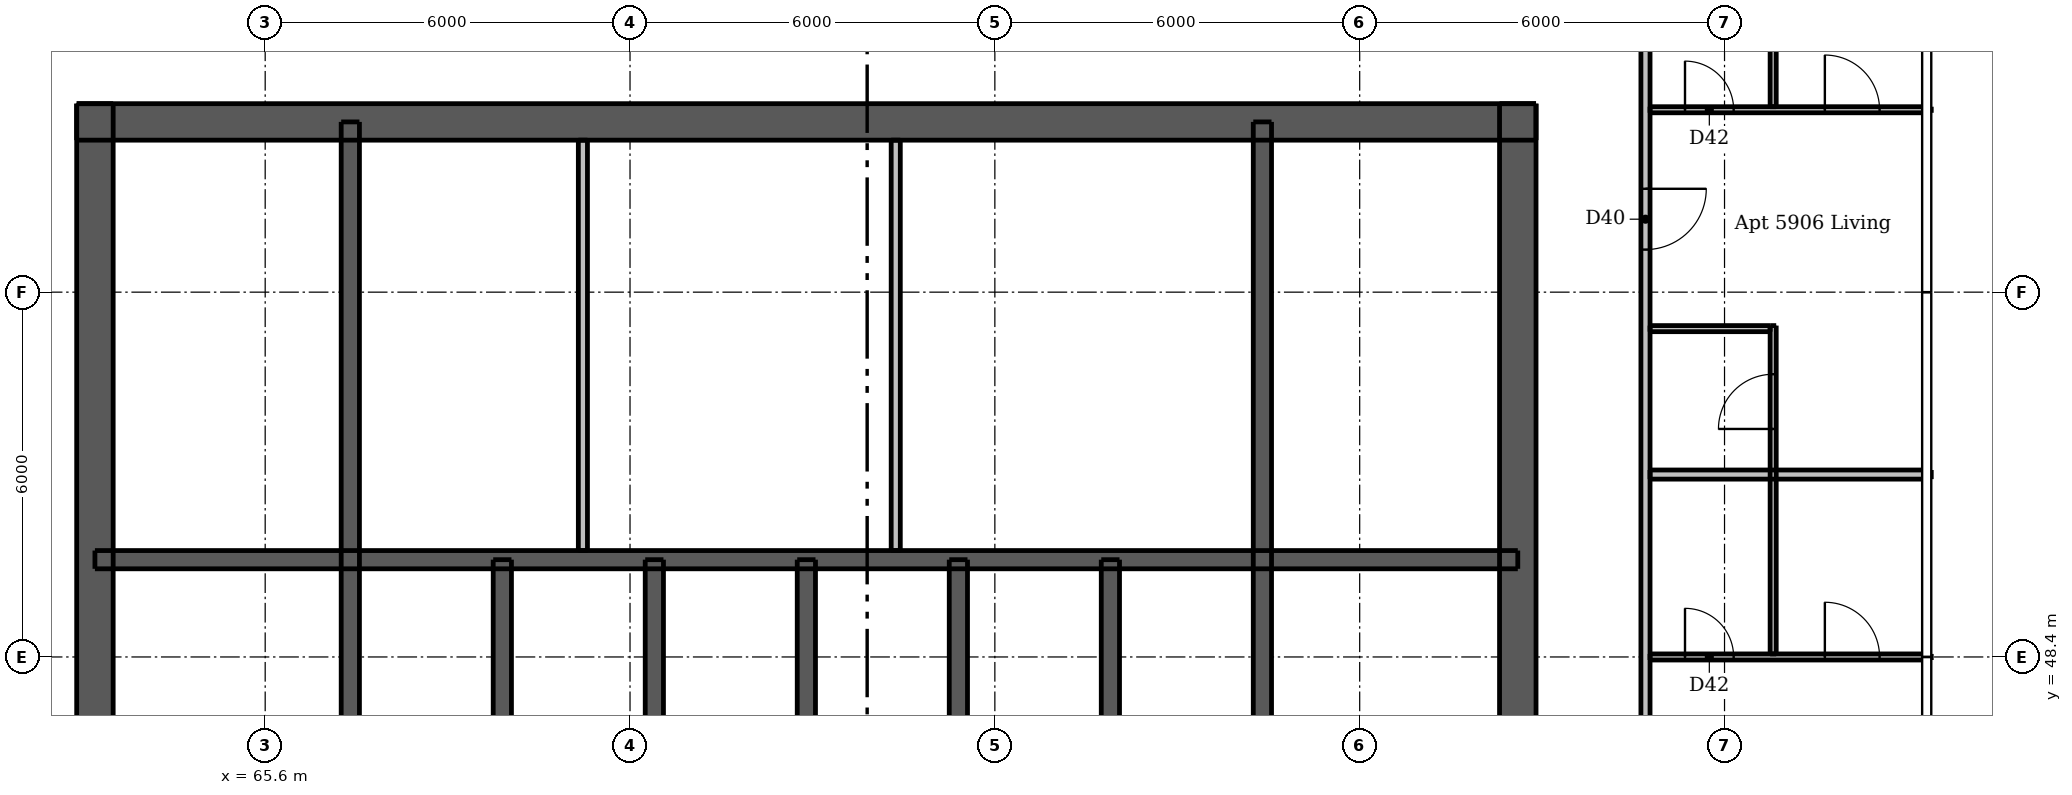
"""IFC4 building model, lengths in metres.
Left out: names, types, materials, properties, quantities, classifications, styles, units other than length and angle.
Written with IfcOpenShell. Run it as: python <this file> out.ifc"""

import sys

from ifc_helpers import new_model, si_unit, direction, frame, frame_2d, origin, place, context, subcontext, project, spatial, rectangle, extrude, element, fill, save


model = new_model("IFC4")
c1 = context("Model", 3, precision=1e-05, world=origin(), true_north=direction((0.0, 1.0)))
c2 = subcontext(c1, "Body", "Model", "MODEL_VIEW")
j1 = project(units=[si_unit("LENGTHUNIT", "METRE"), si_unit("PLANEANGLEUNIT", "RADIAN")], contexts=[c1])
p1 = place(None, origin())
s1 = spatial("IfcSite", under=j1, at=p1, CompositionType="ELEMENT")
p2 = place(p1, origin())
s2 = spatial("IfcBuilding", under=s1, at=p2, CompositionType="ELEMENT")
p3 = place(p2, frame((0.0, 0.0, 220.0)))
s3 = spatial("IfcBuildingStorey", under=s2, at=p3, CompositionType="ELEMENT", Elevation=220.0)
p4 = place(p3, frame((62.5, 57.2, 0.0), z_axis=(0.0, 0.0, 1.0), x_axis=(1.0, 0.0, 0.0)))
e1 = element("IfcWall", 1, at=p4, inside=s3, PredefinedType="SHEAR", context=c2, shape_type="SweptSolid", body=[
    extrude(rectangle(XDim=24.0, YDim=0.6, at=frame_2d((12.0, 0.0))), origin(), (0.0, 0.0, 1.0), 3.05),
])
p5 = place(p4, frame((20.975, 0.0, 0.0)))
e2 = element("IfcOpeningElement", 2, at=p5, cuts=e1, PredefinedType="OPENING", context=c2, shape_type="SweptSolid", body=[
    extrude(rectangle(XDim=1.1, YDim=2.1, at=frame_2d((0.55, 1.05))), frame((0.0, 0.31, 0.0), z_axis=(0.0, -1.0, 0.0), x_axis=(1.0, 0.0, 0.0)), (0.0, 0.0, 1.0), 0.62),
])
p6 = place(p4, frame((1.925, 0.0, 0.0)))
e3 = element("IfcOpeningElement", 3, at=p6, cuts=e1, PredefinedType="OPENING", context=c2, shape_type="SweptSolid", body=[
    extrude(rectangle(XDim=1.1, YDim=2.1, at=frame_2d((0.55, 1.05))), frame((0.0, 0.31, 0.0), z_axis=(0.0, -1.0, 0.0), x_axis=(1.0, 0.0, 0.0)), (0.0, 0.0, 1.0), 0.62),
])
p7 = place(p4, frame((6.038, 0.0, 0.0)))
e4 = element("IfcOpeningElement", 4, at=p7, cuts=e1, PredefinedType="OPENING", context=c2, shape_type="SweptSolid", body=[
    extrude(rectangle(XDim=0.9, YDim=2.1, at=frame_2d((0.45, 1.05))), frame((0.0, 0.31, 0.0), z_axis=(0.0, -1.0, 0.0), x_axis=(1.0, 0.0, 0.0)), (0.0, 0.0, 1.0), 0.62),
])
p8 = place(p4, frame((10.448, 0.0, 0.0)))
e5 = element("IfcOpeningElement", 5, at=p8, cuts=e1, PredefinedType="OPENING", context=c2, shape_type="SweptSolid", body=[
    extrude(rectangle(XDim=0.9, YDim=2.1, at=frame_2d((0.45, 1.05))), frame((0.0, 0.31, 0.0), z_axis=(0.0, -1.0, 0.0), x_axis=(1.0, 0.0, 0.0)), (0.0, 0.0, 1.0), 0.62),
])
p9 = place(p4, frame((15.96, 0.0, 0.0)))
e6 = element("IfcOpeningElement", 6, at=p9, cuts=e1, PredefinedType="OPENING", context=c2, shape_type="SweptSolid", body=[
    extrude(rectangle(XDim=0.9, YDim=2.1, at=frame_2d((0.45, 1.05))), frame((0.0, 0.31, 0.0), z_axis=(0.0, -1.0, 0.0), x_axis=(1.0, 0.0, 0.0)), (0.0, 0.0, 1.0), 0.62),
])
p10 = place(p3, frame((62.8, 33.5, 0.0), z_axis=(0.0, 0.0, 1.0), x_axis=(0.0, 1.0, 0.0)))
e7 = element("IfcWall", 7, at=p10, inside=s3, PredefinedType="SHEAR", context=c2, shape_type="SweptSolid", body=[
    extrude(rectangle(XDim=24.0, YDim=0.6, at=frame_2d((12.0, 0.0))), origin(), (0.0, 0.0, 1.0), 3.05),
])
p11 = place(p10, frame((11.2, 0.0, 0.0)))
e8 = element("IfcOpeningElement", 8, at=p11, cuts=e7, PredefinedType="OPENING", context=c2, shape_type="SweptSolid", body=[
    extrude(rectangle(XDim=1.6, YDim=2.1, at=frame_2d((0.8, 1.05))), frame((0.0, 0.31, 0.0), z_axis=(0.0, -1.0, 0.0), x_axis=(1.0, 0.0, 0.0)), (0.0, 0.0, 1.0), 0.62),
])
p12 = place(p3, frame((86.2, 33.5, 0.0), z_axis=(0.0, 0.0, 1.0), x_axis=(0.0, 1.0, 0.0)))
e9 = element("IfcWall", 9, at=p12, inside=s3, PredefinedType="SHEAR", context=c2, shape_type="SweptSolid", body=[
    extrude(rectangle(XDim=24.0, YDim=0.6, at=frame_2d((12.0, 0.0))), origin(), (0.0, 0.0, 1.0), 3.05),
])
p13 = place(p12, frame((11.2, 0.0, 0.0)))
e10 = element("IfcOpeningElement", 10, at=p13, cuts=e9, PredefinedType="OPENING", context=c2, shape_type="SweptSolid", body=[
    extrude(rectangle(XDim=1.6, YDim=2.1, at=frame_2d((0.8, 1.05))), frame((0.0, 0.31, 0.0), z_axis=(0.0, -1.0, 0.0), x_axis=(1.0, 0.0, 0.0)), (0.0, 0.0, 1.0), 0.62),
])
p14 = place(p3, frame((62.8, 50.0, 0.0), z_axis=(0.0, 0.0, 1.0), x_axis=(1.0, 0.0, 0.0)))
e11 = element("IfcWall", 11, at=p14, inside=s3, PredefinedType="SHEAR", context=c2, shape_type="SweptSolid", body=[
    extrude(rectangle(XDim=23.4, YDim=0.3, at=frame_2d((11.7, 0.0))), origin(), (0.0, 0.0, 1.0), 3.05),
])
for number, where, z_axis, x_axis in (
    (12, (67.0, 47.1, 0.0), (0.0, 0.0, 1.0), (0.0, 1.0, 0.0)),
    (13, (82.0, 47.1, 0.0), (0.0, 0.0, 1.0), (0.0, 1.0, 0.0)),
):
    element("IfcWall", number, at=place(p3, frame(where, z_axis=z_axis, x_axis=x_axis)), inside=s3, PredefinedType="SHEAR", context=c2, shape_type="SweptSolid", body=[
        extrude(rectangle(XDim=10.1, YDim=0.3, at=frame_2d((5.05, 0.0))), origin(), (0.0, 0.0, 1.0), 3.05),
    ])
for number, where, z_axis, x_axis in (
    (14, (69.5, 47.1, 0.0), (0.0, 0.0, 1.0), (0.0, 1.0, 0.0)),
    (15, (72.0, 47.1, 0.0), (0.0, 0.0, 1.0), (0.0, 1.0, 0.0)),
    (16, (74.5, 47.1, 0.0), (0.0, 0.0, 1.0), (0.0, 1.0, 0.0)),
    (17, (77.0, 47.1, 0.0), (0.0, 0.0, 1.0), (0.0, 1.0, 0.0)),
    (18, (79.5, 47.1, 0.0), (0.0, 0.0, 1.0), (0.0, 1.0, 0.0)),
):
    element("IfcWall", number, at=place(p3, frame(where, z_axis=z_axis, x_axis=x_axis)), inside=s3, PredefinedType="SHEAR", context=c2, shape_type="SweptSolid", body=[
        extrude(rectangle(XDim=2.9, YDim=0.3, at=frame_2d((1.45, 0.0))), origin(), (0.0, 0.0, 1.0), 3.05),
    ])
for number, where, z_axis, x_axis in (
    (19, (70.825, 50.15, 0.0), (0.0, 0.0, 1.0), (0.0, 1.0, 0.0)),
    (20, (75.97, 50.15, 0.0), (0.0, 0.0, 1.0), (0.0, 1.0, 0.0)),
):
    element("IfcWall", number, at=place(p3, frame(where, z_axis=z_axis, x_axis=x_axis)), inside=s3, PredefinedType="PLUMBINGWALL", context=c2, shape_type="SweptSolid", body=[
        extrude(rectangle(XDim=6.75, YDim=0.15, at=frame_2d((3.375, 0.0))), origin(), (0.0, 0.0, 1.0), 3.05),
    ])
p15 = place(p3, frame((90.4, 48.45, 0.0), z_axis=(0.0, 0.0, 1.0), x_axis=(0.0, 1.0, 0.0)))
e21 = element("IfcWall", 21, at=p15, inside=s3, PredefinedType="PARTITIONING", context=c2, shape_type="SweptSolid", body=[
    extrude(rectangle(XDim=5.4, YDim=0.1, at=frame_2d((2.7, 0.0))), origin(), (0.0, 0.0, 1.0), 3.05),
])
p16 = place(p15, frame((3.7, 0.0, 0.0)))
e22 = element("IfcOpeningElement", 22, at=p16, cuts=e21, PredefinedType="OPENING", context=c2, shape_type="SweptSolid", body=[
    extrude(rectangle(XDim=0.9, YDim=2.1, at=frame_2d((0.45, 1.05))), frame((0.0, 0.06, 0.0), z_axis=(0.0, -1.0, 0.0), x_axis=(1.0, 0.0, 0.0)), (0.0, 0.0, 1.0), 0.12),
])
p17 = place(p3, frame((90.4, 57.45, 0.0), z_axis=(0.0, 0.0, 1.0), x_axis=(0.0, 1.0, 0.0)))
e23 = element("IfcWall", 23, at=p17, inside=s3, PredefinedType="PARTITIONING", context=c2, shape_type="SweptSolid", body=[
    extrude(rectangle(XDim=2.875, YDim=0.1, at=frame_2d((1.438, 0.0))), origin(), (0.0, 0.0, 1.0), 3.05),
])
p18 = place(p3, frame((88.375, 57.4, 0.0), z_axis=(0.0, 0.0, 1.0), x_axis=(1.0, 0.0, 0.0)))
e24 = element("IfcWall", 24, at=p18, inside=s3, PredefinedType="PARTITIONING", context=c2, shape_type="SweptSolid", body=[
    extrude(rectangle(XDim=4.625, YDim=0.1, at=frame_2d((2.312, 0.0))), origin(), (0.0, 0.0, 1.0), 3.05),
])
p19 = place(p18, frame((2.875, 0.0, 0.0)))
e25 = element("IfcOpeningElement", 25, at=p19, cuts=e24, PredefinedType="OPENING", context=c2, shape_type="SweptSolid", body=[
    extrude(rectangle(XDim=0.9, YDim=2.1, at=frame_2d((0.45, 1.05))), frame((0.0, 0.06, 0.0), z_axis=(0.0, -1.0, 0.0), x_axis=(1.0, 0.0, 0.0)), (0.0, 0.0, 1.0), 0.12),
])
p20 = place(p18, frame((0.575, 0.0, 0.0)))
e26 = element("IfcOpeningElement", 26, at=p20, cuts=e24, PredefinedType="OPENING", context=c2, shape_type="SweptSolid", body=[
    extrude(rectangle(XDim=0.8, YDim=2.1, at=frame_2d((0.4, 1.05))), frame((0.0, 0.06, 0.0), z_axis=(0.0, -1.0, 0.0), x_axis=(1.0, 0.0, 0.0)), (0.0, 0.0, 1.0), 0.12),
])
p21 = place(p3, frame((88.375, 53.8, 0.0), z_axis=(0.0, 0.0, 1.0), x_axis=(1.0, 0.0, 0.0)))
e27 = element("IfcWall", 27, at=p21, inside=s3, PredefinedType="PARTITIONING", context=c2, shape_type="SweptSolid", body=[
    extrude(rectangle(XDim=1.975, YDim=0.1, at=frame_2d((0.988, 0.0))), origin(), (0.0, 0.0, 1.0), 3.05),
])
p22 = place(p3, frame((88.375, 48.4, 0.0), z_axis=(0.0, 0.0, 1.0), x_axis=(1.0, 0.0, 0.0)))
e28 = element("IfcWall", 28, at=p22, inside=s3, PredefinedType="PARTITIONING", context=c2, shape_type="SweptSolid", body=[
    extrude(rectangle(XDim=4.625, YDim=0.1, at=frame_2d((2.312, 0.0))), origin(), (0.0, 0.0, 1.0), 2.516),
])
p23 = place(p22, frame((2.875, 0.0, 0.0)))
e29 = element("IfcOpeningElement", 29, at=p23, cuts=e28, PredefinedType="OPENING", context=c2, shape_type="SweptSolid", body=[
    extrude(rectangle(XDim=0.9, YDim=2.1, at=frame_2d((0.45, 1.05))), frame((0.0, 0.06, 0.0), z_axis=(0.0, -1.0, 0.0), x_axis=(1.0, 0.0, 0.0)), (0.0, 0.0, 1.0), 0.12),
])
p24 = place(p22, frame((0.575, 0.0, 0.0)))
e30 = element("IfcOpeningElement", 30, at=p24, cuts=e28, PredefinedType="OPENING", context=c2, shape_type="SweptSolid", body=[
    extrude(rectangle(XDim=0.8, YDim=2.1, at=frame_2d((0.4, 1.05))), frame((0.0, 0.06, 0.0), z_axis=(0.0, -1.0, 0.0), x_axis=(1.0, 0.0, 0.0)), (0.0, 0.0, 1.0), 0.12),
])
p25 = place(p3, frame((88.3, 61.175, 0.0), z_axis=(0.0, 0.0, 1.0), x_axis=(0.0, -1.0, 0.0)))
e31 = element("IfcWall", 31, at=p25, inside=s3, PredefinedType="PARTITIONING", context=c2, shape_type="SweptSolid", body=[
    extrude(rectangle(XDim=29.4, YDim=0.15, at=frame_2d((14.7, 0.0))), origin(), (0.0, 0.0, 1.0), 3.05),
])
p26 = place(p25, frame((28.125, 0.0, 0.0)))
e32 = element("IfcOpeningElement", 32, at=p26, cuts=e31, PredefinedType="OPENING", context=c2, shape_type="SweptSolid", body=[
    extrude(rectangle(XDim=1.0, YDim=2.1, at=frame_2d((0.5, 1.05))), frame((0.0, 0.085, 0.0), z_axis=(0.0, -1.0, 0.0), x_axis=(1.0, 0.0, 0.0)), (0.0, 0.0, 1.0), 0.17),
])
p27 = place(p25, frame((15.275, 0.0, 0.0)))
e33 = element("IfcOpeningElement", 33, at=p27, cuts=e31, PredefinedType="OPENING", context=c2, shape_type="SweptSolid", body=[
    extrude(rectangle(XDim=1.0, YDim=2.1, at=frame_2d((0.5, 1.05))), frame((0.0, 0.085, 0.0), z_axis=(0.0, -1.0, 0.0), x_axis=(1.0, 0.0, 0.0)), (0.0, 0.0, 1.0), 0.17),
])
p28 = place(p25, frame((5.075, 0.0, 0.0)))
e34 = element("IfcOpeningElement", 34, at=p28, cuts=e31, PredefinedType="OPENING", context=c2, shape_type="SweptSolid", body=[
    extrude(rectangle(XDim=1.0, YDim=2.1, at=frame_2d((0.5, 1.05))), frame((0.0, 0.085, 0.0), z_axis=(0.0, -1.0, 0.0), x_axis=(1.0, 0.0, 0.0)), (0.0, 0.0, 1.0), 0.17),
])
p29 = place(p3, frame((88.375, 51.4, 0.0), z_axis=(0.0, 0.0, 1.0), x_axis=(1.0, 0.0, 0.0)))
e35 = element("IfcWall", 35, at=p29, inside=s3, PredefinedType="PARTITIONING", context=c2, shape_type="SweptSolid", body=[
    extrude(rectangle(XDim=4.625, YDim=0.15, at=frame_2d((2.312, 0.0))), origin(), (0.0, 0.0, 1.0), 3.05),
])
p30 = place(p5, origin())
e36 = element("IfcDoor", 36, at=p30, inside=s3, OperationType="SINGLE_SWING_RIGHT", PredefinedType="DOOR", context=c2, shape_type="SweptSolid", body=[
    extrude(rectangle(XDim=1.1, YDim=2.1, at=frame_2d((0.55, 1.05))), frame((0.0, -0.237, 0.0), z_axis=(0.0, -1.0, 0.0), x_axis=(1.0, 0.0, 0.0)), (0.0, 0.0, 1.0), 0.05),
])
fill(e2, e36)
p31 = place(p6, origin())
e37 = element("IfcDoor", 37, at=p31, inside=s3, OperationType="SINGLE_SWING_LEFT", PredefinedType="DOOR", context=c2, shape_type="SweptSolid", body=[
    extrude(rectangle(XDim=1.1, YDim=2.1, at=frame_2d((0.55, 1.05))), frame((0.0, -0.237, 0.0), z_axis=(0.0, -1.0, 0.0), x_axis=(1.0, 0.0, 0.0)), (0.0, 0.0, 1.0), 0.05),
])
fill(e3, e37)
p32 = place(p7, origin())
e38 = element("IfcDoor", 38, at=p32, inside=s3, OperationType="SINGLE_SWING_RIGHT", PredefinedType="DOOR", context=c2, shape_type="SweptSolid", body=[
    extrude(rectangle(XDim=0.9, YDim=2.1, at=frame_2d((0.45, 1.05))), frame((0.0, -0.237, 0.0), z_axis=(0.0, -1.0, 0.0), x_axis=(1.0, 0.0, 0.0)), (0.0, 0.0, 1.0), 0.05),
])
fill(e4, e38)
p33 = place(p8, origin())
e39 = element("IfcDoor", 39, at=p33, inside=s3, OperationType="SINGLE_SWING_RIGHT", PredefinedType="DOOR", context=c2, shape_type="SweptSolid", body=[
    extrude(rectangle(XDim=0.9, YDim=2.1, at=frame_2d((0.45, 1.05))), frame((0.0, -0.237, 0.0), z_axis=(0.0, -1.0, 0.0), x_axis=(1.0, 0.0, 0.0)), (0.0, 0.0, 1.0), 0.05),
])
fill(e5, e39)
p34 = place(p9, origin())
e40 = element("IfcDoor", 40, at=p34, inside=s3, OperationType="SINGLE_SWING_RIGHT", PredefinedType="DOOR", context=c2, shape_type="SweptSolid", body=[
    extrude(rectangle(XDim=0.9, YDim=2.1, at=frame_2d((0.45, 1.05))), frame((0.0, -0.237, 0.0), z_axis=(0.0, -1.0, 0.0), x_axis=(1.0, 0.0, 0.0)), (0.0, 0.0, 1.0), 0.05),
])
fill(e6, e40)
p35 = place(p23, origin())
e41 = element("IfcDoor", 41, at=p35, inside=s3, OperationType="SINGLE_SWING_LEFT", PredefinedType="DOOR", context=c2, shape_type="SweptSolid", body=[
    extrude(rectangle(XDim=0.9, YDim=2.1, at=frame_2d((0.45, 1.05))), frame((0.0, 0.025, 0.0), z_axis=(0.0, -1.0, 0.0), x_axis=(1.0, 0.0, 0.0)), (0.0, 0.0, 1.0), 0.05),
])
fill(e29, e41)
p36 = place(p24, origin())
e42 = element("IfcDoor", 42, at=p36, inside=s3, OperationType="SINGLE_SWING_LEFT", PredefinedType="DOOR", context=c2, shape_type="SweptSolid", body=[
    extrude(rectangle(XDim=0.8, YDim=2.1, at=frame_2d((0.4, 1.05))), frame((0.0, 0.025, 0.0), z_axis=(0.0, -1.0, 0.0), x_axis=(1.0, 0.0, 0.0)), (0.0, 0.0, 1.0), 0.05),
])
fill(e30, e42)
p37 = place(p28, origin())
e43 = element("IfcDoor", 43, at=p37, inside=s3, OperationType="SINGLE_SWING_LEFT", PredefinedType="DOOR", context=c2, shape_type="SweptSolid", body=[
    extrude(rectangle(XDim=1.0, YDim=2.1, at=frame_2d((0.5, 1.05))), frame((0.0, 0.025, 0.0), z_axis=(0.0, -1.0, 0.0), x_axis=(1.0, 0.0, 0.0)), (0.0, 0.0, 1.0), 0.05),
])
fill(e34, e43)
p38 = place(p16, origin())
e44 = element("IfcDoor", 44, at=p38, inside=s3, OperationType="SINGLE_SWING_LEFT", PredefinedType="DOOR", context=c2, shape_type="SweptSolid", body=[
    extrude(rectangle(XDim=0.9, YDim=2.1, at=frame_2d((0.45, 1.05))), frame((0.0, 0.025, 0.0), z_axis=(0.0, -1.0, 0.0), x_axis=(1.0, 0.0, 0.0)), (0.0, 0.0, 1.0), 0.05),
])
fill(e22, e44)
p39 = place(p19, origin())
e45 = element("IfcDoor", 45, at=p39, inside=s3, OperationType="SINGLE_SWING_LEFT", PredefinedType="DOOR", context=c2, shape_type="SweptSolid", body=[
    extrude(rectangle(XDim=0.9, YDim=2.1, at=frame_2d((0.45, 1.05))), frame((0.0, 0.025, 0.0), z_axis=(0.0, -1.0, 0.0), x_axis=(1.0, 0.0, 0.0)), (0.0, 0.0, 1.0), 0.05),
])
fill(e25, e45)
p40 = place(p20, origin())
e46 = element("IfcDoor", 46, at=p40, inside=s3, OperationType="SINGLE_SWING_LEFT", PredefinedType="DOOR", context=c2, shape_type="SweptSolid", body=[
    extrude(rectangle(XDim=0.8, YDim=2.1, at=frame_2d((0.4, 1.05))), frame((0.0, 0.025, 0.0), z_axis=(0.0, -1.0, 0.0), x_axis=(1.0, 0.0, 0.0)), (0.0, 0.0, 1.0), 0.05),
])
fill(e26, e46)
save(model, sys.argv[1])
